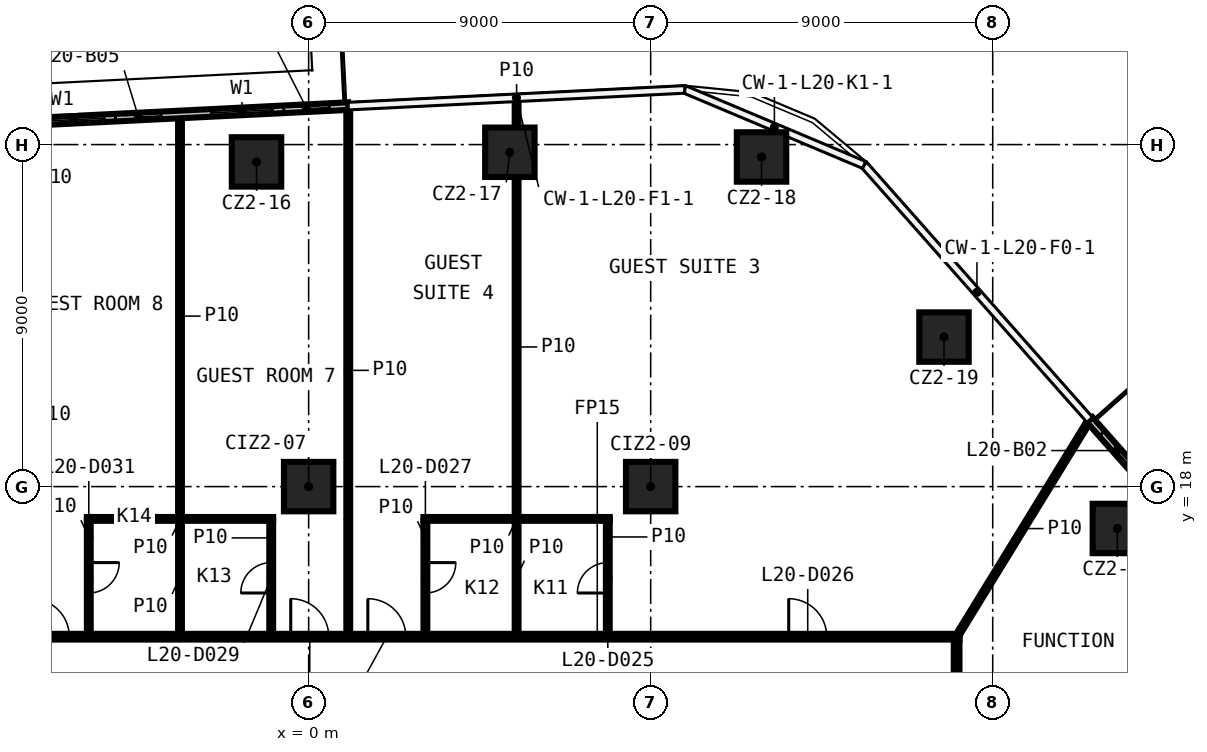
"""IFC4 building model, lengths in metres.
Left out: names, types, materials, properties, quantities, classifications, styles, units other than length and angle.
Written with IfcOpenShell. Run it as: python <this file> out.ifc"""

import sys

from ifc_helpers import new_model, si_unit, direction, frame, frame_2d, origin, origin_2d, place, context, subcontext, project, spatial, rectangle, extrude, element, fill, save


model = new_model("IFC4")
c1 = context("Model", 3, precision=1e-05, world=origin(), true_north=direction((0.0, 1.0)))
c2 = subcontext(c1, "Body", "Model", "MODEL_VIEW")
j1 = project(units=[si_unit("LENGTHUNIT", "METRE"), si_unit("PLANEANGLEUNIT", "RADIAN")], contexts=[c1])
p1 = place(None, origin())
s1 = spatial("IfcSite", under=j1, at=p1, CompositionType="ELEMENT")
p2 = place(p1, origin())
s2 = spatial("IfcBuilding", under=s1, at=p2, CompositionType="ELEMENT")
p3 = place(p2, frame((0.0, 0.0, 98.9)))
s3 = spatial("IfcBuildingStorey", under=s2, at=p3, CompositionType="ELEMENT", Elevation=98.9)
for number, where, z_axis, x_axis in (
    (1, (-1.372, 26.544, 0.0), (0.0, 0.0, 1.0), (1.0, 0.0, 0.0)),
    (2, (5.295, 26.798, 0.0), (0.0, 0.0, 1.0), (1.0, 0.0, 0.0)),
    (3, (11.917, 26.674, 0.0), (0.0, 0.0, 1.0), (1.0, 0.0, 0.0)),
    (4, (16.718, 21.935, 0.0), (0.0, 0.0, 1.0), (1.0, 0.0, 0.0)),
    (5, (21.28, 16.898, 0.0), (0.0, 0.0, 1.0), (1.0, 0.0, 0.0)),
    (6, (0.0, 18.0, 0.0), (0.0, 0.0, 1.0), (1.0, 0.0, 0.0)),
    (7, (9.0, 18.0, 0.0), (0.0, 0.0, 1.0), (1.0, 0.0, 0.0)),
):
    element("IfcColumn", number, at=place(p3, frame(where, z_axis=z_axis, x_axis=x_axis)), inside=s3, PredefinedType="COLUMN", context=c2, shape_type="SweptSolid", body=[
        extrude(rectangle(XDim=1.3, YDim=1.3, at=origin_2d()), origin(), (0.0, 0.0, 1.0), 3.25),
    ])
p4 = place(p3, frame((-17.125, 14.05, 0.0), z_axis=(0.0, 0.0, 1.0), x_axis=(1.0, 0.0, 0.0)))
e8 = element("IfcWall", 8, at=p4, inside=s3, PredefinedType="PARTITIONING", context=c2, shape_type="SweptSolid", body=[
    extrude(rectangle(XDim=34.25, YDim=0.15, at=frame_2d((17.125, 0.0))), origin(), (0.0, 0.0, 1.0), 3.25),
])
p5 = place(p4, frame((29.757, 0.0, 0.0)))
e9 = element("IfcOpeningElement", 9, at=p5, cuts=e8, PredefinedType="OPENING", context=c2, shape_type="SweptSolid", body=[
    extrude(rectangle(XDim=1.0, YDim=2.1, at=frame_2d((0.5, 1.05))), frame((0.0, 0.085, 0.0), z_axis=(0.0, -1.0, 0.0), x_axis=(1.0, 0.0, 0.0)), (0.0, 0.0, 1.0), 0.17),
])
p6 = place(p4, frame((18.682, 0.0, 0.0)))
e10 = element("IfcOpeningElement", 10, at=p6, cuts=e8, PredefinedType="OPENING", context=c2, shape_type="SweptSolid", body=[
    extrude(rectangle(XDim=1.0, YDim=2.1, at=frame_2d((0.5, 1.05))), frame((0.0, 0.085, 0.0), z_axis=(0.0, -1.0, 0.0), x_axis=(1.0, 0.0, 0.0)), (0.0, 0.0, 1.0), 0.17),
])
p7 = place(p4, frame((16.654, 0.0, 0.0)))
e11 = element("IfcOpeningElement", 11, at=p7, cuts=e8, PredefinedType="OPENING", context=c2, shape_type="SweptSolid", body=[
    extrude(rectangle(XDim=1.0, YDim=2.1, at=frame_2d((0.5, 1.05))), frame((0.0, 0.085, 0.0), z_axis=(0.0, -1.0, 0.0), x_axis=(1.0, 0.0, 0.0)), (0.0, 0.0, 1.0), 0.17),
])
p8 = place(p4, frame((9.827, 0.0, 0.0)))
e12 = element("IfcOpeningElement", 12, at=p8, cuts=e8, PredefinedType="OPENING", context=c2, shape_type="SweptSolid", body=[
    extrude(rectangle(XDim=1.0, YDim=2.1, at=frame_2d((0.5, 1.05))), frame((0.0, 0.085, 0.0), z_axis=(0.0, -1.0, 0.0), x_axis=(1.0, 0.0, 0.0)), (0.0, 0.0, 1.0), 0.17),
])
p9 = place(p4, frame((7.8, 0.0, 0.0)))
e13 = element("IfcOpeningElement", 13, at=p9, cuts=e8, PredefinedType="OPENING", context=c2, shape_type="SweptSolid", body=[
    extrude(rectangle(XDim=1.0, YDim=2.1, at=frame_2d((0.5, 1.05))), frame((0.0, 0.085, 0.0), z_axis=(0.0, -1.0, 0.0), x_axis=(1.0, 0.0, 0.0)), (0.0, 0.0, 1.0), 0.17),
])
p10 = place(p4, frame((2.56, 0.0, 0.0)))
e14 = element("IfcOpeningElement", 14, at=p10, cuts=e8, PredefinedType="OPENING", context=c2, shape_type="SweptSolid", body=[
    extrude(rectangle(XDim=0.9, YDim=2.1, at=frame_2d((0.45, 1.05))), frame((0.0, 0.085, 0.0), z_axis=(0.0, -1.0, 0.0), x_axis=(1.0, 0.0, 0.0)), (0.0, 0.0, 1.0), 0.17),
])
for number, where, z_axis, x_axis in (
    (15, (-5.834, 17.15, 0.0), (0.0, 0.0, 1.0), (1.0, 0.0, 0.0)),
    (16, (3.022, 17.15, 0.0), (0.0, 0.0, 1.0), (1.0, 0.0, 0.0)),
):
    element("IfcWall", number, at=place(p3, frame(where, z_axis=z_axis, x_axis=x_axis)), inside=s3, PredefinedType="PARTITIONING", context=c2, shape_type="SweptSolid", body=[
        extrude(rectangle(XDim=4.9, YDim=0.1, at=frame_2d((2.45, 0.0))), origin(), (0.0, 0.0, 1.0), 3.25),
    ])
p11 = place(p3, frame((17.05, 14.05, 0.0), z_axis=(0.0, 0.0, 1.0), x_axis=(0.523105565691, 0.852267896346, 0.0)))
e17 = element("IfcWall", 17, at=p11, inside=s3, PredefinedType="PARTITIONING", context=c2, shape_type="SweptSolid", body=[
    extrude(rectangle(XDim=6.677, YDim=0.1, at=frame_2d((3.338, 0.0))), origin(), (0.0, 0.0, 1.0), 3.25),
])
p12 = place(p3, frame((17.05, 13.975, 0.0), z_axis=(0.0, 0.0, 1.0), x_axis=(0.0, -1.0, 0.0)))
e18 = element("IfcWall", 18, at=p12, inside=s3, PredefinedType="PARTITIONING", context=c2, shape_type="SweptSolid", body=[
    extrude(rectangle(XDim=27.95, YDim=0.15, at=frame_2d((13.975, 0.0))), origin(), (0.0, 0.0, 1.0), 3.25),
])
p13 = place(p12, frame((25.274, 0.0, 0.0)))
e19 = element("IfcOpeningElement", 19, at=p13, cuts=e18, PredefinedType="OPENING", context=c2, shape_type="SweptSolid", body=[
    extrude(rectangle(XDim=0.9, YDim=2.1, at=frame_2d((0.45, 1.05))), frame((0.0, 0.085, 0.0), z_axis=(0.0, -1.0, 0.0), x_axis=(1.0, 0.0, 0.0)), (0.0, 0.0, 1.0), 0.17),
])
p14 = place(p12, frame((18.854, 0.0, 0.0)))
e20 = element("IfcOpeningElement", 20, at=p14, cuts=e18, PredefinedType="OPENING", context=c2, shape_type="SweptSolid", body=[
    extrude(rectangle(XDim=1.0, YDim=2.1, at=frame_2d((0.5, 1.05))), frame((0.0, 0.085, 0.0), z_axis=(0.0, -1.0, 0.0), x_axis=(1.0, 0.0, 0.0)), (0.0, 0.0, 1.0), 0.17),
])
p15 = place(p12, frame((17.299, 0.0, 0.0)))
e21 = element("IfcOpeningElement", 21, at=p15, cuts=e18, PredefinedType="OPENING", context=c2, shape_type="SweptSolid", body=[
    extrude(rectangle(XDim=1.0, YDim=2.1, at=frame_2d((0.5, 1.05))), frame((0.0, 0.085, 0.0), z_axis=(0.0, -1.0, 0.0), x_axis=(1.0, 0.0, 0.0)), (0.0, 0.0, 1.0), 0.17),
])
p16 = place(p12, frame((11.171, 0.0, 0.0)))
e22 = element("IfcOpeningElement", 22, at=p16, cuts=e18, PredefinedType="OPENING", context=c2, shape_type="SweptSolid", body=[
    extrude(rectangle(XDim=0.9, YDim=2.1, at=frame_2d((0.45, 1.05))), frame((0.0, 0.085, 0.0), z_axis=(0.0, -1.0, 0.0), x_axis=(1.0, 0.0, 0.0)), (0.0, 0.0, 1.0), 0.17),
])
p17 = place(p12, frame((7.243, 0.0, 0.0)))
e23 = element("IfcOpeningElement", 23, at=p17, cuts=e18, PredefinedType="OPENING", context=c2, shape_type="SweptSolid", body=[
    extrude(rectangle(XDim=0.9, YDim=2.1, at=frame_2d((0.45, 1.05))), frame((0.0, 0.085, 0.0), z_axis=(0.0, -1.0, 0.0), x_axis=(1.0, 0.0, 0.0)), (0.0, 0.0, 1.0), 0.17),
])
p18 = place(p12, frame((2.153, 0.0, 0.0)))
e24 = element("IfcOpeningElement", 24, at=p18, cuts=e18, PredefinedType="OPENING", context=c2, shape_type="SweptSolid", body=[
    extrude(rectangle(XDim=0.9, YDim=2.1, at=frame_2d((0.45, 1.05))), frame((0.0, 0.085, 0.0), z_axis=(0.0, -1.0, 0.0), x_axis=(1.0, 0.0, 0.0)), (0.0, 0.0, 1.0), 0.17),
])
p19 = place(p3, frame((7.872, 14.125, 0.0), z_axis=(0.0, 0.0, 1.0), x_axis=(0.0, 1.0, 0.0)))
e25 = element("IfcWall", 25, at=p19, inside=s3, PredefinedType="PARTITIONING", context=c2, shape_type="SweptSolid", body=[
    extrude(rectangle(XDim=3.025, YDim=0.1, at=frame_2d((1.512, 0.0))), origin(), (0.0, 0.0, 1.0), 3.25),
])
p20 = place(p19, frame((1.075, 0.0, 0.0)))
e26 = element("IfcOpeningElement", 26, at=p20, cuts=e25, PredefinedType="OPENING", context=c2, shape_type="SweptSolid", body=[
    extrude(rectangle(XDim=0.8, YDim=2.1, at=frame_2d((0.4, 1.05))), frame((0.0, 0.06, 0.0), z_axis=(0.0, -1.0, 0.0), x_axis=(1.0, 0.0, 0.0)), (0.0, 0.0, 1.0), 0.12),
])
p21 = place(p3, frame((5.472, 14.125, 0.0), z_axis=(0.0, 0.0, 1.0), x_axis=(0.0, 1.0, 0.0)))
e27 = element("IfcWall", 27, at=p21, inside=s3, PredefinedType="PARTITIONING", context=c2, shape_type="SweptSolid", body=[
    extrude(rectangle(XDim=2.975, YDim=0.1, at=frame_2d((1.488, 0.0))), origin(), (0.0, 0.0, 1.0), 3.25),
])
p22 = place(p3, frame((5.472, 17.2, 0.0), z_axis=(0.0, 0.0, 1.0), x_axis=(0.0, 1.0, 0.0)))
e28 = element("IfcWall", 28, at=p22, inside=s3, PredefinedType="PARTITIONING", context=c2, shape_type="SweptSolid", body=[
    extrude(rectangle(XDim=8.948, YDim=0.1, at=frame_2d((4.474, 0.0))), origin(), (0.0, 0.0, 1.0), 3.25),
])
p23 = place(p3, frame((5.472, 27.448, 0.0), z_axis=(0.0, 0.0, 1.0), x_axis=(0.0, 1.0, 0.0)))
e29 = element("IfcWall", 29, at=p23, inside=s3, PredefinedType="PARTITIONING", context=c2, shape_type="SweptSolid", body=[
    extrude(rectangle(XDim=0.764, YDim=0.1, at=frame_2d((0.382, 0.0))), origin(), (0.0, 0.0, 1.0), 3.25),
])
p24 = place(p3, frame((3.072, 17.1, 0.0), z_axis=(0.0, 0.0, 1.0), x_axis=(0.0, -1.0, 0.0)))
e30 = element("IfcWall", 30, at=p24, inside=s3, PredefinedType="PARTITIONING", context=c2, shape_type="SweptSolid", body=[
    extrude(rectangle(XDim=2.975, YDim=0.1, at=frame_2d((1.488, 0.0))), origin(), (0.0, 0.0, 1.0), 3.25),
])
p25 = place(p24, frame((1.1, 0.0, 0.0)))
e31 = element("IfcOpeningElement", 31, at=p25, cuts=e30, PredefinedType="OPENING", context=c2, shape_type="SweptSolid", body=[
    extrude(rectangle(XDim=0.8, YDim=2.1, at=frame_2d((0.4, 1.05))), frame((0.0, 0.06, 0.0), z_axis=(0.0, -1.0, 0.0), x_axis=(1.0, 0.0, 0.0)), (0.0, 0.0, 1.0), 0.12),
])
p26 = place(p3, frame((1.042, 14.125, 0.0), z_axis=(0.0, 0.0, 1.0), x_axis=(0.0, 1.0, 0.0)))
e32 = element("IfcWall", 32, at=p26, inside=s3, PredefinedType="PARTITIONING", context=c2, shape_type="SweptSolid", body=[
    extrude(rectangle(XDim=13.867, YDim=0.1, at=frame_2d((6.934, 0.0))), origin(), (0.0, 0.0, 1.0), 3.25),
])
p27 = place(p3, frame((-0.985, 14.125, 0.0), z_axis=(0.0, 0.0, 1.0), x_axis=(0.0, 1.0, 0.0)))
e33 = element("IfcWall", 33, at=p27, inside=s3, PredefinedType="PARTITIONING", context=c2, shape_type="SweptSolid", body=[
    extrude(rectangle(XDim=2.975, YDim=0.1, at=frame_2d((1.488, 0.0))), origin(), (0.0, 0.0, 1.0), 3.25),
])
p28 = place(p27, frame((1.075, 0.0, 0.0)))
e34 = element("IfcOpeningElement", 34, at=p28, cuts=e33, PredefinedType="OPENING", context=c2, shape_type="SweptSolid", body=[
    extrude(rectangle(XDim=0.8, YDim=2.1, at=frame_2d((0.4, 1.05))), frame((0.0, 0.06, 0.0), z_axis=(0.0, -1.0, 0.0), x_axis=(1.0, 0.0, 0.0)), (0.0, 0.0, 1.0), 0.12),
])
p29 = place(p3, frame((-3.385, 14.125, 0.0), z_axis=(0.0, 0.0, 1.0), x_axis=(0.0, 1.0, 0.0)))
e35 = element("IfcWall", 35, at=p29, inside=s3, PredefinedType="PARTITIONING", context=c2, shape_type="SweptSolid", body=[
    extrude(rectangle(XDim=2.975, YDim=0.1, at=frame_2d((1.488, 0.0))), origin(), (0.0, 0.0, 1.0), 3.25),
])
p30 = place(p3, frame((-3.385, 17.2, 0.0), z_axis=(0.0, 0.0, 1.0), x_axis=(0.0, 1.0, 0.0)))
e36 = element("IfcWall", 36, at=p30, inside=s3, PredefinedType="PARTITIONING", context=c2, shape_type="SweptSolid", body=[
    extrude(rectangle(XDim=10.573, YDim=0.1, at=frame_2d((5.287, 0.0))), origin(), (0.0, 0.0, 1.0), 3.25),
])
p31 = place(p3, frame((-5.785, 17.15, 0.0), z_axis=(0.0, 0.0, 1.0), x_axis=(0.0, -1.0, 0.0)))
e37 = element("IfcWall", 37, at=p31, inside=s3, PredefinedType="PARTITIONING", context=c2, shape_type="SweptSolid", body=[
    extrude(rectangle(XDim=3.025, YDim=0.1, at=frame_2d((1.512, 0.0))), origin(), (0.0, 0.0, 1.0), 3.25),
])
p32 = place(p31, frame((1.15, 0.0, 0.0)))
e38 = element("IfcOpeningElement", 38, at=p32, cuts=e37, PredefinedType="OPENING", context=c2, shape_type="SweptSolid", body=[
    extrude(rectangle(XDim=0.8, YDim=2.1, at=frame_2d((0.4, 1.05))), frame((0.0, 0.06, 0.0), z_axis=(0.0, -1.0, 0.0), x_axis=(1.0, 0.0, 0.0)), (0.0, 0.0, 1.0), 0.12),
])
p33 = place(p3, frame((26.495, 13.046, 0.0), z_axis=(0.0, 0.0, 1.0), x_axis=(-0.662851206757, 0.748751145376, 0.0)))
e39 = element("IfcWall", 39, at=p33, inside=s3, PredefinedType="SOLIDWALL", context=c2, shape_type="SweptSolid", body=[
    extrude(rectangle(XDim=8.964, YDim=0.2, at=frame_2d((4.482, 0.0))), origin(), (0.0, 0.0, 1.0), 3.25),
])
p34 = place(p33, frame((2.1, 0.0, 0.6)))
e40 = element("IfcOpeningElement", 40, at=p34, cuts=e39, PredefinedType="OPENING", context=c2, shape_type="SweptSolid", body=[
    extrude(rectangle(XDim=1.6, YDim=2.4, at=frame_2d((0.8, 1.2))), frame((0.0, 0.11, 0.0), z_axis=(0.0, -1.0, 0.0), x_axis=(1.0, 0.0, 0.0)), (0.0, 0.0, 1.0), 0.22),
])
p35 = place(p33, frame((0.6, 0.0, 0.0)))
e41 = element("IfcOpeningElement", 41, at=p35, cuts=e39, PredefinedType="OPENING", context=c2, shape_type="SweptSolid", body=[
    extrude(rectangle(XDim=1.2, YDim=2.4, at=frame_2d((0.6, 1.2))), frame((0.0, 0.11, 0.0), z_axis=(0.0, -1.0, 0.0), x_axis=(1.0, 0.0, 0.0)), (0.0, 0.0, 1.0), 0.22),
])
p36 = place(p33, frame((4.982, 0.0, 0.6)))
e42 = element("IfcOpeningElement", 42, at=p36, cuts=e39, PredefinedType="OPENING", context=c2, shape_type="SweptSolid", body=[
    extrude(rectangle(XDim=1.6, YDim=2.4, at=frame_2d((0.8, 1.2))), frame((0.0, 0.11, 0.0), z_axis=(0.0, -1.0, 0.0), x_axis=(1.0, 0.0, 0.0)), (0.0, 0.0, 1.0), 0.22),
])
p37 = place(p33, frame((7.282, 0.0, 0.0)))
e43 = element("IfcOpeningElement", 43, at=p37, cuts=e39, PredefinedType="OPENING", context=c2, shape_type="SweptSolid", body=[
    extrude(rectangle(XDim=1.2, YDim=2.4, at=frame_2d((0.6, 1.2))), frame((0.0, 0.11, 0.0), z_axis=(0.0, -1.0, 0.0), x_axis=(1.0, 0.0, 0.0)), (0.0, 0.0, 1.0), 0.22),
])
p38 = place(p3, frame((1.042, 28.012, 0.0), z_axis=(0.0, 0.0, 1.0), x_axis=(-0.998772222794, -0.049538338427, 0.0)))
e44 = element("IfcWall", 44, at=p38, inside=s3, PredefinedType="SOLIDWALL", context=c2, shape_type="SweptSolid", body=[
    extrude(rectangle(XDim=13.297, YDim=0.2, at=frame_2d((6.648, 0.0))), origin(), (0.0, 0.0, 1.0), 3.25),
])
p39 = place(p38, frame((2.0, 0.0, 0.6)))
e45 = element("IfcOpeningElement", 45, at=p39, cuts=e44, PredefinedType="OPENING", context=c2, shape_type="SweptSolid", body=[
    extrude(rectangle(XDim=1.6, YDim=2.4, at=frame_2d((0.8, 1.2))), frame((0.0, 0.11, 0.0), z_axis=(0.0, -1.0, 0.0), x_axis=(1.0, 0.0, 0.0)), (0.0, 0.0, 1.0), 0.22),
])
p40 = place(p38, frame((0.5, 0.0, 0.0)))
e46 = element("IfcOpeningElement", 46, at=p40, cuts=e44, PredefinedType="OPENING", context=c2, shape_type="SweptSolid", body=[
    extrude(rectangle(XDim=1.2, YDim=2.4, at=frame_2d((0.6, 1.2))), frame((0.0, 0.11, 0.0), z_axis=(0.0, -1.0, 0.0), x_axis=(1.0, 0.0, 0.0)), (0.0, 0.0, 1.0), 0.22),
])
p41 = place(p38, frame((6.432, 0.0, 0.6)))
e47 = element("IfcOpeningElement", 47, at=p41, cuts=e44, PredefinedType="OPENING", context=c2, shape_type="SweptSolid", body=[
    extrude(rectangle(XDim=1.6, YDim=2.4, at=frame_2d((0.8, 1.2))), frame((0.0, 0.11, 0.0), z_axis=(0.0, -1.0, 0.0), x_axis=(1.0, 0.0, 0.0)), (0.0, 0.0, 1.0), 0.22),
])
p42 = place(p38, frame((4.932, 0.0, 0.0)))
e48 = element("IfcOpeningElement", 48, at=p42, cuts=e44, PredefinedType="OPENING", context=c2, shape_type="SweptSolid", body=[
    extrude(rectangle(XDim=1.2, YDim=2.4, at=frame_2d((0.6, 1.2))), frame((0.0, 0.11, 0.0), z_axis=(0.0, -1.0, 0.0), x_axis=(1.0, 0.0, 0.0)), (0.0, 0.0, 1.0), 0.22),
])
p43 = place(p38, frame((9.365, 0.0, 0.6)))
e49 = element("IfcOpeningElement", 49, at=p43, cuts=e44, PredefinedType="OPENING", context=c2, shape_type="SweptSolid", body=[
    extrude(rectangle(XDim=1.6, YDim=2.4, at=frame_2d((0.8, 1.2))), frame((0.0, 0.11, 0.0), z_axis=(0.0, -1.0, 0.0), x_axis=(1.0, 0.0, 0.0)), (0.0, 0.0, 1.0), 0.22),
])
p44 = place(p38, frame((11.264, 0.0, 0.0)))
e50 = element("IfcOpeningElement", 50, at=p44, cuts=e44, PredefinedType="OPENING", context=c2, shape_type="SweptSolid", body=[
    extrude(rectangle(XDim=1.2, YDim=2.4, at=frame_2d((0.6, 1.2))), frame((0.0, 0.11, 0.0), z_axis=(0.0, -1.0, 0.0), x_axis=(1.0, 0.0, 0.0)), (0.0, 0.0, 1.0), 0.22),
])
p45 = place(p20, origin())
e51 = element("IfcDoor", 51, at=p45, inside=s3, OperationType="SINGLE_SWING_RIGHT", PredefinedType="DOOR", context=c2, shape_type="SweptSolid", body=[
    extrude(rectangle(XDim=0.8, YDim=2.1, at=frame_2d((0.4, 1.05))), frame((0.0, 0.025, 0.0), z_axis=(0.0, -1.0, 0.0), x_axis=(1.0, 0.0, 0.0)), (0.0, 0.0, 1.0), 0.05),
])
fill(e26, e51)
p46 = place(p5, origin())
e52 = element("IfcDoor", 52, at=p46, inside=s3, OperationType="SINGLE_SWING_LEFT", PredefinedType="DOOR", context=c2, shape_type="SweptSolid", body=[
    extrude(rectangle(XDim=1.0, YDim=2.1, at=frame_2d((0.5, 1.05))), frame((0.0, 0.025, 0.0), z_axis=(0.0, -1.0, 0.0), x_axis=(1.0, 0.0, 0.0)), (0.0, 0.0, 1.0), 0.05),
])
fill(e9, e52)
p47 = place(p25, origin())
e53 = element("IfcDoor", 53, at=p47, inside=s3, OperationType="SINGLE_SWING_LEFT", PredefinedType="DOOR", context=c2, shape_type="SweptSolid", body=[
    extrude(rectangle(XDim=0.8, YDim=2.1, at=frame_2d((0.4, 1.05))), frame((0.0, 0.025, 0.0), z_axis=(0.0, -1.0, 0.0), x_axis=(1.0, 0.0, 0.0)), (0.0, 0.0, 1.0), 0.05),
])
fill(e31, e53)
p48 = place(p6, origin())
e54 = element("IfcDoor", 54, at=p48, inside=s3, OperationType="SINGLE_SWING_RIGHT", PredefinedType="DOOR", context=c2, shape_type="SweptSolid", body=[
    extrude(rectangle(XDim=1.0, YDim=2.1, at=frame_2d((0.5, 1.05))), frame((0.0, 0.025, 0.0), z_axis=(0.0, -1.0, 0.0), x_axis=(1.0, 0.0, 0.0)), (0.0, 0.0, 1.0), 0.05),
])
fill(e10, e54)
p49 = place(p28, origin())
e55 = element("IfcDoor", 55, at=p49, inside=s3, OperationType="SINGLE_SWING_RIGHT", PredefinedType="DOOR", context=c2, shape_type="SweptSolid", body=[
    extrude(rectangle(XDim=0.8, YDim=2.1, at=frame_2d((0.4, 1.05))), frame((0.0, 0.025, 0.0), z_axis=(0.0, -1.0, 0.0), x_axis=(1.0, 0.0, 0.0)), (0.0, 0.0, 1.0), 0.05),
])
fill(e34, e55)
p50 = place(p7, origin())
e56 = element("IfcDoor", 56, at=p50, inside=s3, OperationType="SINGLE_SWING_LEFT", PredefinedType="DOOR", context=c2, shape_type="SweptSolid", body=[
    extrude(rectangle(XDim=1.0, YDim=2.1, at=frame_2d((0.5, 1.05))), frame((0.0, 0.025, 0.0), z_axis=(0.0, -1.0, 0.0), x_axis=(1.0, 0.0, 0.0)), (0.0, 0.0, 1.0), 0.05),
])
fill(e11, e56)
p51 = place(p32, origin())
e57 = element("IfcDoor", 57, at=p51, inside=s3, OperationType="SINGLE_SWING_LEFT", PredefinedType="DOOR", context=c2, shape_type="SweptSolid", body=[
    extrude(rectangle(XDim=0.8, YDim=2.1, at=frame_2d((0.4, 1.05))), frame((0.0, 0.025, 0.0), z_axis=(0.0, -1.0, 0.0), x_axis=(1.0, 0.0, 0.0)), (0.0, 0.0, 1.0), 0.05),
])
fill(e38, e57)
p52 = place(p8, origin())
e58 = element("IfcDoor", 58, at=p52, inside=s3, OperationType="SINGLE_SWING_RIGHT", PredefinedType="DOOR", context=c2, shape_type="SweptSolid", body=[
    extrude(rectangle(XDim=1.0, YDim=2.1, at=frame_2d((0.5, 1.05))), frame((0.0, 0.025, 0.0), z_axis=(0.0, -1.0, 0.0), x_axis=(1.0, 0.0, 0.0)), (0.0, 0.0, 1.0), 0.05),
])
fill(e12, e58)
p53 = place(p37, origin())
e59 = element("IfcDoor", 59, at=p53, inside=s3, OperationType="SLIDING_TO_LEFT", PredefinedType="DOOR", context=c2, shape_type="SweptSolid", body=[
    extrude(rectangle(XDim=1.2, YDim=2.4, at=frame_2d((0.6, 1.2))), frame((0.0, 0.025, 0.0), z_axis=(0.0, -1.0, 0.0), x_axis=(1.0, 0.0, 0.0)), (0.0, 0.0, 1.0), 0.05),
])
fill(e43, e59)
p54 = place(p39, origin())
e60 = element("IfcWindow", 60, at=p54, inside=s3, PartitioningType="SINGLE_PANEL", PredefinedType="WINDOW", context=c2, shape_type="SweptSolid", body=[
    extrude(rectangle(XDim=1.6, YDim=2.4, at=frame_2d((0.8, 1.2))), frame((0.0, 0.03, 0.0), z_axis=(0.0, -1.0, 0.0), x_axis=(1.0, 0.0, 0.0)), (0.0, 0.0, 1.0), 0.06),
])
fill(e45, e60)
p55 = place(p40, origin())
e61 = element("IfcDoor", 61, at=p55, inside=s3, OperationType="SLIDING_TO_LEFT", PredefinedType="DOOR", context=c2, shape_type="SweptSolid", body=[
    extrude(rectangle(XDim=1.2, YDim=2.4, at=frame_2d((0.6, 1.2))), frame((0.0, 0.025, 0.0), z_axis=(0.0, -1.0, 0.0), x_axis=(1.0, 0.0, 0.0)), (0.0, 0.0, 1.0), 0.05),
])
fill(e46, e61)
p56 = place(p41, origin())
e62 = element("IfcWindow", 62, at=p56, inside=s3, PartitioningType="SINGLE_PANEL", PredefinedType="WINDOW", context=c2, shape_type="SweptSolid", body=[
    extrude(rectangle(XDim=1.6, YDim=2.4, at=frame_2d((0.8, 1.2))), frame((0.0, 0.03, 0.0), z_axis=(0.0, -1.0, 0.0), x_axis=(1.0, 0.0, 0.0)), (0.0, 0.0, 1.0), 0.06),
])
fill(e47, e62)
p57 = place(p42, origin())
e63 = element("IfcDoor", 63, at=p57, inside=s3, OperationType="SLIDING_TO_LEFT", PredefinedType="DOOR", context=c2, shape_type="SweptSolid", body=[
    extrude(rectangle(XDim=1.2, YDim=2.4, at=frame_2d((0.6, 1.2))), frame((0.0, 0.025, 0.0), z_axis=(0.0, -1.0, 0.0), x_axis=(1.0, 0.0, 0.0)), (0.0, 0.0, 1.0), 0.05),
])
fill(e48, e63)
save(model, sys.argv[1])
